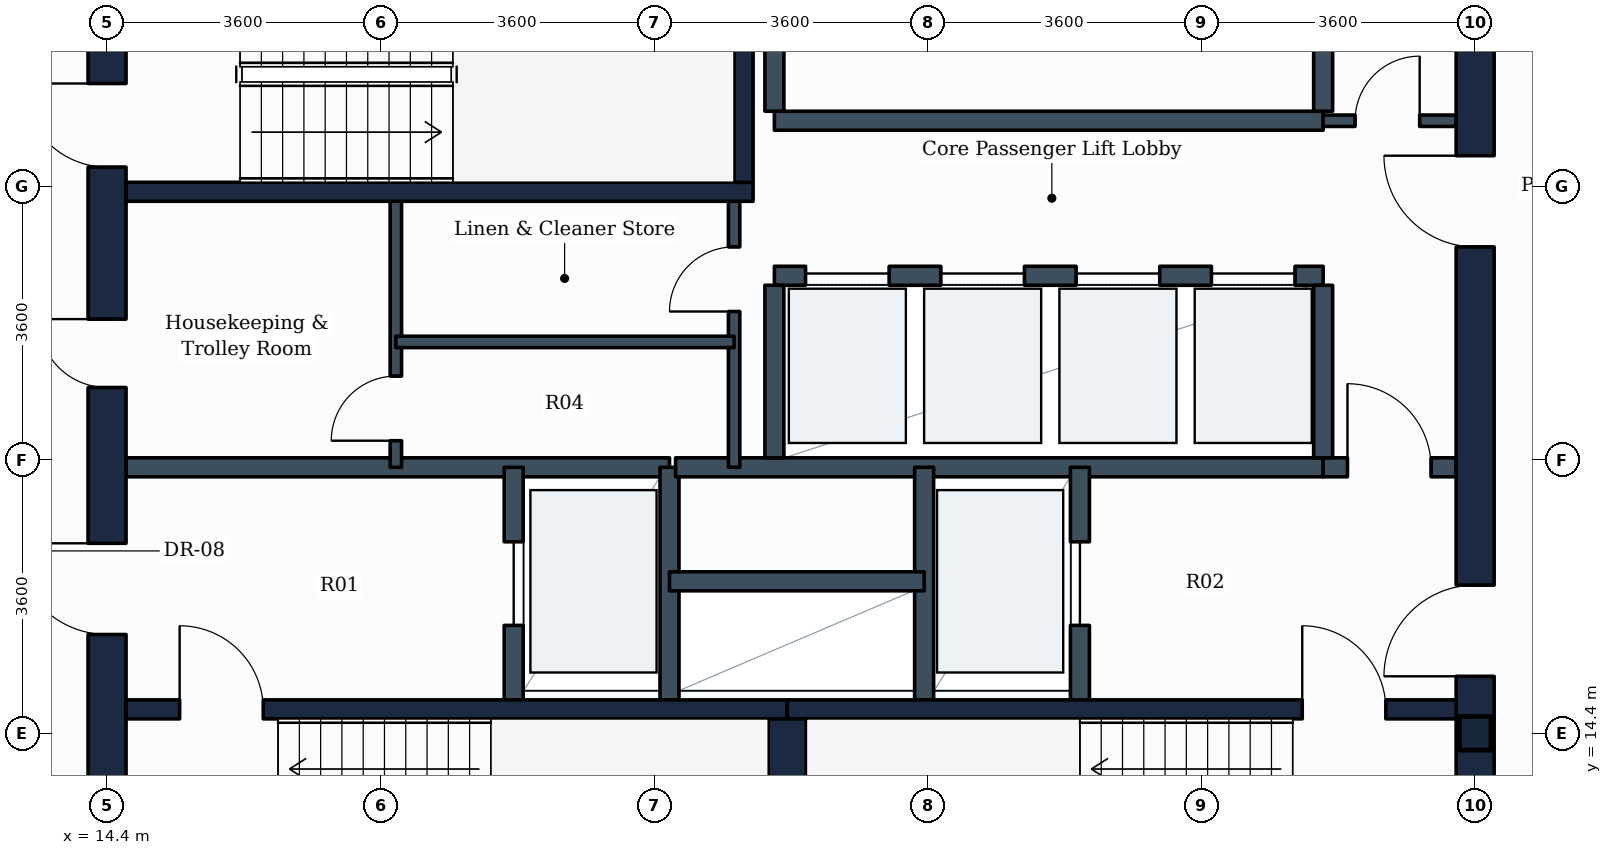
"""IFC4 building model, lengths in metres.
Left out: names, types, materials, properties, quantities, classifications, styles, units other than length and angle.
Written with IfcOpenShell. Run it as: python <this file> out.ifc"""

import sys

from ifc_helpers import new_model, si_unit, direction, frame, frame_2d, origin, origin_2d, place, context, subcontext, project, spatial, rectangle, i_section, extrude, element, fill, save


model = new_model("IFC4")
c1 = context("Model", 3, precision=1e-05, world=origin(), true_north=direction((0.0, 1.0)))
c2 = subcontext(c1, "Body", "Model", "MODEL_VIEW")
j1 = project(units=[si_unit("LENGTHUNIT", "METRE"), si_unit("PLANEANGLEUNIT", "RADIAN")], contexts=[c1])
p1 = place(None, origin())
s1 = spatial("IfcSite", under=j1, at=p1, CompositionType="ELEMENT")
p2 = place(p1, origin())
s2 = spatial("IfcBuilding", under=s1, at=p2, CompositionType="ELEMENT")
p3 = place(p2, frame((0.0, 0.0, 161.8)))
s3 = spatial("IfcBuildingStorey", under=s2, at=p3, CompositionType="ELEMENT", Elevation=161.8)
p4 = place(p3, frame((32.4, 14.4, 0.0), z_axis=(0.0, 0.0, 1.0), x_axis=(1.0, 0.0, 0.0)))
e1 = element("IfcColumn", 1, at=p4, inside=s3, PredefinedType="COLUMN", context=c2, shape_type="SweptSolid", body=[
    extrude(i_section(OverallWidth=0.416, OverallDepth=0.442, WebThickness=0.025, FlangeThickness=0.041, FilletRadius=0.015, at=origin_2d()), origin(), (0.0, 0.0, 1.0), 3.8),
])
p5 = place(p3, frame((14.4, 10.8, 0.0), z_axis=(0.0, 0.0, 1.0), x_axis=(0.0, 1.0, 0.0)))
e2 = element("IfcWall", 2, at=p5, inside=s3, PredefinedType="SHEAR", context=c2, shape_type="SweptSolid", body=[
    extrude(rectangle(XDim=14.4, YDim=0.5, at=frame_2d((7.2, 0.0))), origin(), (0.0, 0.0, 1.0), 3.55),
])
p6 = place(p5, frame((11.05, 0.0, 0.0)))
e3 = element("IfcOpeningElement", 3, at=p6, cuts=e2, PredefinedType="OPENING", context=c2, shape_type="SweptSolid", body=[
    extrude(rectangle(XDim=1.1, YDim=2.1, at=frame_2d((0.55, 1.05))), frame((0.0, 0.26, 0.0), z_axis=(0.0, -1.0, 0.0), x_axis=(1.0, 0.0, 0.0)), (0.0, 0.0, 1.0), 0.52),
])
p7 = place(p5, frame((4.9, 0.0, 0.0)))
e4 = element("IfcOpeningElement", 4, at=p7, cuts=e2, PredefinedType="OPENING", context=c2, shape_type="SweptSolid", body=[
    extrude(rectangle(XDim=1.2, YDim=2.1, at=frame_2d((0.6, 1.05))), frame((0.0, 0.26, 0.0), z_axis=(0.0, -1.0, 0.0), x_axis=(1.0, 0.0, 0.0)), (0.0, 0.0, 1.0), 0.52),
])
p8 = place(p5, frame((8.15, 0.0, 0.0)))
e5 = element("IfcOpeningElement", 5, at=p8, cuts=e2, PredefinedType="OPENING", context=c2, shape_type="SweptSolid", body=[
    extrude(rectangle(XDim=0.9, YDim=2.1, at=frame_2d((0.45, 1.05))), frame((0.0, 0.26, 0.0), z_axis=(0.0, -1.0, 0.0), x_axis=(1.0, 0.0, 0.0)), (0.0, 0.0, 1.0), 0.52),
])
p9 = place(p3, frame((32.4, 10.8, 0.0), z_axis=(0.0, 0.0, 1.0), x_axis=(0.0, 1.0, 0.0)))
e6 = element("IfcWall", 6, at=p9, inside=s3, PredefinedType="SHEAR", context=c2, shape_type="SweptSolid", body=[
    extrude(rectangle(XDim=14.4, YDim=0.5, at=frame_2d((7.2, 0.0))), origin(), (0.0, 0.0, 1.0), 3.55),
])
p10 = place(p9, frame((4.35, 0.0, 0.0)))
e7 = element("IfcOpeningElement", 7, at=p10, cuts=e6, PredefinedType="OPENING", context=c2, shape_type="SweptSolid", body=[
    extrude(rectangle(XDim=1.2, YDim=2.1, at=frame_2d((0.6, 1.05))), frame((0.0, 0.26, 0.0), z_axis=(0.0, -1.0, 0.0), x_axis=(1.0, 0.0, 0.0)), (0.0, 0.0, 1.0), 0.52),
])
p11 = place(p9, frame((10.0, 0.0, 0.0)))
e8 = element("IfcOpeningElement", 8, at=p11, cuts=e6, PredefinedType="OPENING", context=c2, shape_type="SweptSolid", body=[
    extrude(rectangle(XDim=1.2, YDim=2.1, at=frame_2d((0.6, 1.05))), frame((0.0, 0.26, 0.0), z_axis=(0.0, -1.0, 0.0), x_axis=(1.0, 0.0, 0.0)), (0.0, 0.0, 1.0), 0.52),
])
p12 = place(p3, frame((14.65, 14.715, 0.0), z_axis=(0.0, 0.0, 1.0), x_axis=(1.0, 0.0, 0.0)))
e9 = element("IfcWall", 9, at=p12, inside=s3, PredefinedType="SHEAR", context=c2, shape_type="SweptSolid", body=[
    extrude(rectangle(XDim=8.7, YDim=0.25, at=frame_2d((4.35, 0.0))), origin(), (0.0, 0.0, 1.0), 3.55),
])
p13 = place(p12, frame((0.705, 0.0, 0.0)))
e10 = element("IfcOpeningElement", 10, at=p13, cuts=e9, PredefinedType="OPENING", context=c2, shape_type="SweptSolid", body=[
    extrude(rectangle(XDim=1.1, YDim=2.1, at=frame_2d((0.55, 1.05))), frame((0.0, 0.135, 0.0), z_axis=(0.0, -1.0, 0.0), x_axis=(1.0, 0.0, 0.0)), (0.0, 0.0, 1.0), 0.27),
])
p14 = place(p3, frame((23.35, 14.715, 0.0), z_axis=(0.0, 0.0, 1.0), x_axis=(1.0, 0.0, 0.0)))
e11 = element("IfcWall", 11, at=p14, inside=s3, PredefinedType="SHEAR", context=c2, shape_type="SweptSolid", body=[
    extrude(rectangle(XDim=8.8, YDim=0.25, at=frame_2d((4.4, 0.0))), origin(), (0.0, 0.0, 1.0), 3.55),
])
p15 = place(p14, frame((6.775, 0.0, 0.0)))
e12 = element("IfcOpeningElement", 12, at=p15, cuts=e11, PredefinedType="OPENING", context=c2, shape_type="SweptSolid", body=[
    extrude(rectangle(XDim=1.1, YDim=2.1, at=frame_2d((0.55, 1.05))), frame((0.0, 0.135, 0.0), z_axis=(0.0, -1.0, 0.0), x_axis=(1.0, 0.0, 0.0)), (0.0, 0.0, 1.0), 0.27),
])
p16 = place(p3, frame((23.35, 11.75, 0.0), z_axis=(0.0, 0.0, 1.0), x_axis=(0.0, 1.0, 0.0)))
e13 = element("IfcWall", 13, at=p16, inside=s3, PredefinedType="SHEAR", context=c2, shape_type="SweptSolid", body=[
    extrude(rectangle(XDim=2.84, YDim=0.5, at=frame_2d((1.42, 0.0))), origin(), (0.0, 0.0, 1.0), 3.55),
])
p17 = place(p3, frame((14.65, 21.525, 0.0), z_axis=(0.0, 0.0, 1.0), x_axis=(1.0, 0.0, 0.0)))
e14 = element("IfcWall", 14, at=p17, inside=s3, PredefinedType="SHEAR", context=c2, shape_type="SweptSolid", body=[
    extrude(rectangle(XDim=8.25, YDim=0.25, at=frame_2d((4.125, 0.0))), origin(), (0.0, 0.0, 1.0), 3.55),
])
p18 = place(p3, frame((22.775, 21.65, 0.0), z_axis=(0.0, 0.0, 1.0), x_axis=(0.0, 1.0, 0.0)))
e15 = element("IfcWall", 15, at=p18, inside=s3, PredefinedType="SHEAR", context=c2, shape_type="SweptSolid", body=[
    extrude(rectangle(XDim=2.84, YDim=0.25, at=frame_2d((1.42, 0.0))), origin(), (0.0, 0.0, 1.0), 3.55),
])
p19 = place(p3, frame((14.65, 17.9, 0.0), z_axis=(0.0, 0.0, 1.0), x_axis=(1.0, 0.0, 0.0)))
e16 = element("IfcWall", 16, at=p19, inside=s3, PredefinedType="PARTITIONING", context=c2, shape_type="SweptSolid", body=[
    extrude(rectangle(XDim=7.15, YDim=0.25, at=frame_2d((3.575, 0.0))), origin(), (0.0, 0.0, 1.0), 3.535),
])
p20 = place(p3, frame((19.75, 14.84, 0.0), z_axis=(0.0, 0.0, 1.0), x_axis=(0.0, 1.0, 0.0)))
e17 = element("IfcWall", 17, at=p20, inside=s3, PredefinedType="PARTITIONING", context=c2, shape_type="SweptSolid", body=[
    extrude(rectangle(XDim=3.06, YDim=0.25, at=frame_2d((1.53, 0.0))), origin(), (0.0, 0.0, 1.0), 3.535),
])
p21 = place(p20, frame((0.98, 0.0, 0.0)))
e18 = element("IfcOpeningElement", 18, at=p21, cuts=e17, PredefinedType="OPENING", context=c2, shape_type="SweptSolid", body=[
    extrude(rectangle(XDim=1.1, YDim=2.1, at=frame_2d((0.55, 1.05))), frame((0.0, 0.135, 0.0), z_axis=(0.0, -1.0, 0.0), x_axis=(1.0, 0.0, 0.0)), (0.0, 0.0, 1.0), 0.27),
])
p22 = place(p3, frame((21.8, 14.84, 0.0), z_axis=(0.0, 0.0, 1.0), x_axis=(0.0, 1.0, 0.0)))
e19 = element("IfcWall", 19, at=p22, inside=s3, PredefinedType="PARTITIONING", context=c2, shape_type="SweptSolid", body=[
    extrude(rectangle(XDim=3.06, YDim=0.25, at=frame_2d((1.53, 0.0))), origin(), (0.0, 0.0, 1.0), 3.535),
])
p23 = place(p3, frame((21.88, 17.9, 0.0), z_axis=(0.0, 0.0, 1.0), x_axis=(1.0, 0.0, 0.0)))
e20 = element("IfcWall", 20, at=p23, inside=s3, PredefinedType="PARTITIONING", context=c2, shape_type="SweptSolid", body=[
    extrude(rectangle(XDim=8.52, YDim=0.25, at=frame_2d((4.26, 0.0))), origin(), (0.0, 0.0, 1.0), 3.535),
])
p24 = place(p3, frame((30.4, 17.9, 0.0), z_axis=(0.0, 0.0, 1.0), x_axis=(1.0, 0.0, 0.0)))
e21 = element("IfcWall", 21, at=p24, inside=s3, PredefinedType="PARTITIONING", context=c2, shape_type="SweptSolid", body=[
    extrude(rectangle(XDim=1.75, YDim=0.25, at=frame_2d((0.875, 0.0))), origin(), (0.0, 0.0, 1.0), 3.535),
])
p25 = place(p24, frame((0.32, 0.0, 0.0)))
e22 = element("IfcOpeningElement", 22, at=p25, cuts=e21, PredefinedType="OPENING", context=c2, shape_type="SweptSolid", body=[
    extrude(rectangle(XDim=1.1, YDim=2.1, at=frame_2d((0.55, 1.05))), frame((0.0, 0.135, 0.0), z_axis=(0.0, -1.0, 0.0), x_axis=(1.0, 0.0, 0.0)), (0.0, 0.0, 1.0), 0.27),
])
p26 = place(p3, frame((25.15, 14.84, 0.0), z_axis=(0.0, 0.0, 1.0), x_axis=(0.0, 1.0, 0.0)))
e23 = element("IfcWall", 23, at=p26, inside=s3, PredefinedType="PARTITIONING", context=c2, shape_type="SweptSolid", body=[
    extrude(rectangle(XDim=3.06, YDim=0.25, at=frame_2d((1.53, 0.0))), origin(), (0.0, 0.0, 1.0), 3.535),
])
p27 = place(p3, frame((27.2, 14.84, 0.0), z_axis=(0.0, 0.0, 1.0), x_axis=(0.0, 1.0, 0.0)))
e24 = element("IfcWall", 24, at=p27, inside=s3, PredefinedType="PARTITIONING", context=c2, shape_type="SweptSolid", body=[
    extrude(rectangle(XDim=3.06, YDim=0.25, at=frame_2d((1.53, 0.0))), origin(), (0.0, 0.0, 1.0), 3.535),
])
p28 = place(p27, frame((0.98, 0.0, 0.0)))
e25 = element("IfcOpeningElement", 25, at=p28, cuts=e24, PredefinedType="OPENING", context=c2, shape_type="SweptSolid", body=[
    extrude(rectangle(XDim=1.1, YDim=2.1, at=frame_2d((0.55, 1.05))), frame((0.0, 0.135, 0.0), z_axis=(0.0, -1.0, 0.0), x_axis=(1.0, 0.0, 0.0)), (0.0, 0.0, 1.0), 0.27),
])
p29 = place(p3, frame((21.8, 16.4, 0.0), z_axis=(0.0, 0.0, 1.0), x_axis=(1.0, 0.0, 0.0)))
e26 = element("IfcWall", 26, at=p29, inside=s3, PredefinedType="PARTITIONING", context=c2, shape_type="SweptSolid", body=[
    extrude(rectangle(XDim=3.35, YDim=0.25, at=frame_2d((1.675, 0.0))), origin(), (0.0, 0.0, 1.0), 3.535),
])
p30 = place(p3, frame((23.18, 20.42, 0.0), z_axis=(0.0, 0.0, 1.0), x_axis=(1.0, 0.0, 0.0)))
e27 = element("IfcWall", 27, at=p30, inside=s3, PredefinedType="PARTITIONING", context=c2, shape_type="SweptSolid", body=[
    extrude(rectangle(XDim=7.22, YDim=0.25, at=frame_2d((3.61, 0.0))), origin(), (0.0, 0.0, 1.0), 3.535),
])
p31 = place(p30, frame((0.41, 0.0, 0.0)))
e28 = element("IfcOpeningElement", 28, at=p31, cuts=e27, PredefinedType="OPENING", context=c2, shape_type="SweptSolid", body=[
    extrude(rectangle(XDim=1.1, YDim=2.1, at=frame_2d((0.55, 1.05))), frame((0.0, 0.135, 0.0), z_axis=(0.0, -1.0, 0.0), x_axis=(1.0, 0.0, 0.0)), (0.0, 0.0, 1.0), 0.27),
])
p32 = place(p30, frame((2.19, 0.0, 0.0)))
e29 = element("IfcOpeningElement", 29, at=p32, cuts=e27, PredefinedType="OPENING", context=c2, shape_type="SweptSolid", body=[
    extrude(rectangle(XDim=1.1, YDim=2.1, at=frame_2d((0.55, 1.05))), frame((0.0, 0.135, 0.0), z_axis=(0.0, -1.0, 0.0), x_axis=(1.0, 0.0, 0.0)), (0.0, 0.0, 1.0), 0.27),
])
p33 = place(p30, frame((3.97, 0.0, 0.0)))
e30 = element("IfcOpeningElement", 30, at=p33, cuts=e27, PredefinedType="OPENING", context=c2, shape_type="SweptSolid", body=[
    extrude(rectangle(XDim=1.1, YDim=2.1, at=frame_2d((0.55, 1.05))), frame((0.0, 0.135, 0.0), z_axis=(0.0, -1.0, 0.0), x_axis=(1.0, 0.0, 0.0)), (0.0, 0.0, 1.0), 0.27),
])
p34 = place(p30, frame((5.75, 0.0, 0.0)))
e31 = element("IfcOpeningElement", 31, at=p34, cuts=e27, PredefinedType="OPENING", context=c2, shape_type="SweptSolid", body=[
    extrude(rectangle(XDim=1.1, YDim=2.1, at=frame_2d((0.55, 1.05))), frame((0.0, 0.135, 0.0), z_axis=(0.0, -1.0, 0.0), x_axis=(1.0, 0.0, 0.0)), (0.0, 0.0, 1.0), 0.27),
])
for number, where, z_axis, x_axis in (
    (32, (23.18, 18.025, 0.0), (0.0, 0.0, 1.0), (0.0, 1.0, 0.0)),
    (33, (30.4, 18.025, 0.0), (0.0, 0.0, 1.0), (0.0, 1.0, 0.0)),
):
    element("IfcWall", number, at=place(p3, frame(where, z_axis=z_axis, x_axis=x_axis)), inside=s3, PredefinedType="PARTITIONING", context=c2, shape_type="SweptSolid", body=[
        extrude(rectangle(XDim=2.27, YDim=0.25, at=frame_2d((1.135, 0.0))), origin(), (0.0, 0.0, 1.0), 3.535),
    ])
p35 = place(p3, frame((23.18, 22.46, 0.0), z_axis=(0.0, 0.0, 1.0), x_axis=(1.0, 0.0, 0.0)))
e34 = element("IfcWall", 34, at=p35, inside=s3, PredefinedType="PARTITIONING", context=c2, shape_type="SweptSolid", body=[
    extrude(rectangle(XDim=7.22, YDim=0.25, at=frame_2d((3.61, 0.0))), origin(), (0.0, 0.0, 1.0), 3.535),
])
for number, where, z_axis, x_axis in (
    (35, (23.18, 22.585, 0.0), (0.0, 0.0, 1.0), (0.0, 1.0, 0.0)),
    (36, (30.4, 22.585, 0.0), (0.0, 0.0, 1.0), (0.0, 1.0, 0.0)),
):
    element("IfcWall", number, at=place(p3, frame(where, z_axis=z_axis, x_axis=x_axis)), inside=s3, PredefinedType="PARTITIONING", context=c2, shape_type="SweptSolid", body=[
        extrude(rectangle(XDim=2.315, YDim=0.25, at=frame_2d((1.157, 0.0))), origin(), (0.0, 0.0, 1.0), 3.535),
    ])
p36 = place(p3, frame((22.65, 17.9, 0.0), z_axis=(0.0, 0.0, 1.0), x_axis=(0.0, 1.0, 0.0)))
e37 = element("IfcWall", 37, at=p36, inside=s3, PredefinedType="PARTITIONING", context=c2, shape_type="SweptSolid", body=[
    extrude(rectangle(XDim=3.625, YDim=0.15, at=frame_2d((1.812, 0.0))), origin(), (0.0, 0.0, 1.0), 3.535),
])
p37 = place(p36, frame((2.05, 0.0, 0.0)))
e38 = element("IfcOpeningElement", 38, at=p37, cuts=e37, PredefinedType="OPENING", context=c2, shape_type="SweptSolid", body=[
    extrude(rectangle(XDim=0.85, YDim=2.1, at=frame_2d((0.425, 1.05))), frame((0.0, 0.085, 0.0), z_axis=(0.0, -1.0, 0.0), x_axis=(1.0, 0.0, 0.0)), (0.0, 0.0, 1.0), 0.17),
])
p38 = place(p3, frame((18.2, 17.9, 0.0), z_axis=(0.0, 0.0, 1.0), x_axis=(0.0, 1.0, 0.0)))
e39 = element("IfcWall", 39, at=p38, inside=s3, PredefinedType="PARTITIONING", context=c2, shape_type="SweptSolid", body=[
    extrude(rectangle(XDim=3.625, YDim=0.15, at=frame_2d((1.812, 0.0))), origin(), (0.0, 0.0, 1.0), 3.535),
])
p39 = place(p38, frame((0.35, 0.0, 0.0)))
e40 = element("IfcOpeningElement", 40, at=p39, cuts=e39, PredefinedType="OPENING", context=c2, shape_type="SweptSolid", body=[
    extrude(rectangle(XDim=0.85, YDim=2.1, at=frame_2d((0.425, 1.05))), frame((0.0, 0.085, 0.0), z_axis=(0.0, -1.0, 0.0), x_axis=(1.0, 0.0, 0.0)), (0.0, 0.0, 1.0), 0.17),
])
p40 = place(p3, frame((18.2, 19.55, 0.0), z_axis=(0.0, 0.0, 1.0), x_axis=(1.0, 0.0, 0.0)))
e41 = element("IfcWall", 41, at=p40, inside=s3, PredefinedType="PARTITIONING", context=c2, shape_type="SweptSolid", body=[
    extrude(rectangle(XDim=4.45, YDim=0.15, at=frame_2d((2.225, 0.0))), origin(), (0.0, 0.0, 1.0), 3.535),
])
p41 = place(p3, frame((30.4, 22.46, 0.0), z_axis=(0.0, 0.0, 1.0), x_axis=(1.0, 0.0, 0.0)))
e42 = element("IfcWall", 42, at=p41, inside=s3, PredefinedType="PARTITIONING", context=c2, shape_type="SweptSolid", body=[
    extrude(rectangle(XDim=1.75, YDim=0.15, at=frame_2d((0.875, 0.0))), origin(), (0.0, 0.0, 1.0), 3.535),
])
p42 = place(p41, frame((0.42, 0.0, 0.0)))
e43 = element("IfcOpeningElement", 43, at=p42, cuts=e42, PredefinedType="OPENING", context=c2, shape_type="SweptSolid", body=[
    extrude(rectangle(XDim=0.85, YDim=2.1, at=frame_2d((0.425, 1.05))), frame((0.0, 0.085, 0.0), z_axis=(0.0, -1.0, 0.0), x_axis=(1.0, 0.0, 0.0)), (0.0, 0.0, 1.0), 0.17),
])
p43 = place(p13, origin())
e44 = element("IfcDoor", 44, at=p43, inside=s3, OperationType="SINGLE_SWING_LEFT", PredefinedType="DOOR", context=c2, shape_type="SweptSolid", body=[
    extrude(rectangle(XDim=1.1, YDim=2.1, at=frame_2d((0.55, 1.05))), frame((0.0, 0.025, 0.0), z_axis=(0.0, -1.0, 0.0), x_axis=(1.0, 0.0, 0.0)), (0.0, 0.0, 1.0), 0.05),
])
fill(e10, e44)
p44 = place(p15, origin())
e45 = element("IfcDoor", 45, at=p44, inside=s3, OperationType="SINGLE_SWING_LEFT", PredefinedType="DOOR", context=c2, shape_type="SweptSolid", body=[
    extrude(rectangle(XDim=1.1, YDim=2.1, at=frame_2d((0.55, 1.05))), frame((0.0, 0.025, 0.0), z_axis=(0.0, -1.0, 0.0), x_axis=(1.0, 0.0, 0.0)), (0.0, 0.0, 1.0), 0.05),
])
fill(e12, e45)
p45 = place(p6, origin())
e46 = element("IfcDoor", 46, at=p45, inside=s3, OperationType="SINGLE_SWING_RIGHT", PredefinedType="DOOR", context=c2, shape_type="SweptSolid", body=[
    extrude(rectangle(XDim=1.1, YDim=2.1, at=frame_2d((0.55, 1.05))), frame((0.0, 0.025, 0.0), z_axis=(0.0, -1.0, 0.0), x_axis=(1.0, 0.0, 0.0)), (0.0, 0.0, 1.0), 0.05),
])
fill(e3, e46)
p46 = place(p21, origin())
e47 = element("IfcDoor", 47, at=p46, inside=s3, OperationType="SLIDING_TO_LEFT", PredefinedType="DOOR", context=c2, shape_type="SweptSolid", body=[
    extrude(rectangle(XDim=1.1, YDim=2.1, at=frame_2d((0.55, 1.05))), frame((0.0, 0.025, 0.0), z_axis=(0.0, -1.0, 0.0), x_axis=(1.0, 0.0, 0.0)), (0.0, 0.0, 1.0), 0.05),
])
fill(e18, e47)
p47 = place(p28, origin())
e48 = element("IfcDoor", 48, at=p47, inside=s3, OperationType="SLIDING_TO_LEFT", PredefinedType="DOOR", context=c2, shape_type="SweptSolid", body=[
    extrude(rectangle(XDim=1.1, YDim=2.1, at=frame_2d((0.55, 1.05))), frame((0.0, 0.025, 0.0), z_axis=(0.0, -1.0, 0.0), x_axis=(1.0, 0.0, 0.0)), (0.0, 0.0, 1.0), 0.05),
])
fill(e25, e48)
p48 = place(p7, origin())
e49 = element("IfcDoor", 49, at=p48, inside=s3, OperationType="SINGLE_SWING_RIGHT", PredefinedType="DOOR", context=c2, shape_type="SweptSolid", body=[
    extrude(rectangle(XDim=1.2, YDim=2.1, at=frame_2d((0.6, 1.05))), frame((0.0, 0.025, 0.0), z_axis=(0.0, -1.0, 0.0), x_axis=(1.0, 0.0, 0.0)), (0.0, 0.0, 1.0), 0.05),
])
fill(e4, e49)
p49 = place(p10, origin())
e50 = element("IfcDoor", 50, at=p49, inside=s3, OperationType="SINGLE_SWING_LEFT", PredefinedType="DOOR", context=c2, shape_type="SweptSolid", body=[
    extrude(rectangle(XDim=1.2, YDim=2.1, at=frame_2d((0.6, 1.05))), frame((0.0, 0.025, 0.0), z_axis=(0.0, -1.0, 0.0), x_axis=(1.0, 0.0, 0.0)), (0.0, 0.0, 1.0), 0.05),
])
fill(e7, e50)
p50 = place(p25, origin())
e51 = element("IfcDoor", 51, at=p50, inside=s3, OperationType="SINGLE_SWING_LEFT", PredefinedType="DOOR", context=c2, shape_type="SweptSolid", body=[
    extrude(rectangle(XDim=1.1, YDim=2.1, at=frame_2d((0.55, 1.05))), frame((0.0, 0.025, 0.0), z_axis=(0.0, -1.0, 0.0), x_axis=(1.0, 0.0, 0.0)), (0.0, 0.0, 1.0), 0.05),
])
fill(e22, e51)
p51 = place(p31, origin())
e52 = element("IfcDoor", 52, at=p51, inside=s3, OperationType="SLIDING_TO_LEFT", PredefinedType="DOOR", context=c2, shape_type="SweptSolid", body=[
    extrude(rectangle(XDim=1.1, YDim=2.1, at=frame_2d((0.55, 1.05))), frame((0.0, 0.025, 0.0), z_axis=(0.0, -1.0, 0.0), x_axis=(1.0, 0.0, 0.0)), (0.0, 0.0, 1.0), 0.05),
])
fill(e28, e52)
p52 = place(p32, origin())
e53 = element("IfcDoor", 53, at=p52, inside=s3, OperationType="SLIDING_TO_LEFT", PredefinedType="DOOR", context=c2, shape_type="SweptSolid", body=[
    extrude(rectangle(XDim=1.1, YDim=2.1, at=frame_2d((0.55, 1.05))), frame((0.0, 0.025, 0.0), z_axis=(0.0, -1.0, 0.0), x_axis=(1.0, 0.0, 0.0)), (0.0, 0.0, 1.0), 0.05),
])
fill(e29, e53)
p53 = place(p33, origin())
e54 = element("IfcDoor", 54, at=p53, inside=s3, OperationType="SLIDING_TO_LEFT", PredefinedType="DOOR", context=c2, shape_type="SweptSolid", body=[
    extrude(rectangle(XDim=1.1, YDim=2.1, at=frame_2d((0.55, 1.05))), frame((0.0, 0.025, 0.0), z_axis=(0.0, -1.0, 0.0), x_axis=(1.0, 0.0, 0.0)), (0.0, 0.0, 1.0), 0.05),
])
fill(e30, e54)
p54 = place(p34, origin())
e55 = element("IfcDoor", 55, at=p54, inside=s3, OperationType="SLIDING_TO_LEFT", PredefinedType="DOOR", context=c2, shape_type="SweptSolid", body=[
    extrude(rectangle(XDim=1.1, YDim=2.1, at=frame_2d((0.55, 1.05))), frame((0.0, 0.025, 0.0), z_axis=(0.0, -1.0, 0.0), x_axis=(1.0, 0.0, 0.0)), (0.0, 0.0, 1.0), 0.05),
])
fill(e31, e55)
p55 = place(p11, origin())
e56 = element("IfcDoor", 56, at=p55, inside=s3, OperationType="SINGLE_SWING_RIGHT", PredefinedType="DOOR", context=c2, shape_type="SweptSolid", body=[
    extrude(rectangle(XDim=1.2, YDim=2.1, at=frame_2d((0.6, 1.05))), frame((0.0, 0.025, 0.0), z_axis=(0.0, -1.0, 0.0), x_axis=(1.0, 0.0, 0.0)), (0.0, 0.0, 1.0), 0.05),
])
fill(e8, e56)
p56 = place(p8, origin())
e57 = element("IfcDoor", 57, at=p56, inside=s3, OperationType="SINGLE_SWING_RIGHT", PredefinedType="DOOR", context=c2, shape_type="SweptSolid", body=[
    extrude(rectangle(XDim=0.9, YDim=2.1, at=frame_2d((0.45, 1.05))), frame((0.0, 0.025, 0.0), z_axis=(0.0, -1.0, 0.0), x_axis=(1.0, 0.0, 0.0)), (0.0, 0.0, 1.0), 0.05),
])
fill(e5, e57)
p57 = place(p39, origin())
e58 = element("IfcDoor", 58, at=p57, inside=s3, OperationType="SINGLE_SWING_LEFT", PredefinedType="DOOR", context=c2, shape_type="SweptSolid", body=[
    extrude(rectangle(XDim=0.85, YDim=2.1, at=frame_2d((0.425, 1.05))), frame((0.0, 0.025, 0.0), z_axis=(0.0, -1.0, 0.0), x_axis=(1.0, 0.0, 0.0)), (0.0, 0.0, 1.0), 0.05),
])
fill(e40, e58)
p58 = place(p37, origin())
e59 = element("IfcDoor", 59, at=p58, inside=s3, OperationType="SINGLE_SWING_LEFT", PredefinedType="DOOR", context=c2, shape_type="SweptSolid", body=[
    extrude(rectangle(XDim=0.85, YDim=2.1, at=frame_2d((0.425, 1.05))), frame((0.0, 0.025, 0.0), z_axis=(0.0, -1.0, 0.0), x_axis=(1.0, 0.0, 0.0)), (0.0, 0.0, 1.0), 0.05),
])
fill(e38, e59)
p59 = place(p42, origin())
e60 = element("IfcDoor", 60, at=p59, inside=s3, OperationType="SINGLE_SWING_RIGHT", PredefinedType="DOOR", context=c2, shape_type="SweptSolid", body=[
    extrude(rectangle(XDim=0.85, YDim=2.1, at=frame_2d((0.425, 1.05))), frame((0.0, 0.025, 0.0), z_axis=(0.0, -1.0, 0.0), x_axis=(1.0, 0.0, 0.0)), (0.0, 0.0, 1.0), 0.05),
])
fill(e43, e60)
save(model, sys.argv[1])
